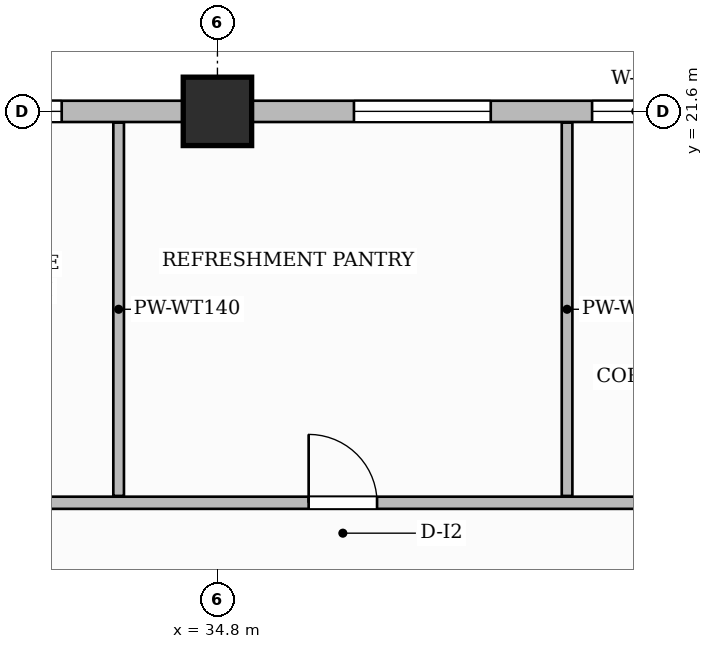
"""IFC4 building model, lengths in metres.
Left out: names, types, materials, properties, quantities, classifications, styles, units other than length and angle.
Written with IfcOpenShell. Run it as: python <this file> out.ifc"""

import sys

from ifc_helpers import new_model, si_unit, direction, frame, frame_2d, origin, origin_2d, place, context, subcontext, project, spatial, rectangle, extrude, source, transform, mapped, element, fill, save


model = new_model("IFC4")
c1 = context("Model", 3, precision=1e-05, world=origin(), true_north=direction((0.0, 1.0)))
c2 = subcontext(c1, "Body", "Model", "MODEL_VIEW")
j1 = project(units=[si_unit("LENGTHUNIT", "METRE"), si_unit("PLANEANGLEUNIT", "RADIAN")], contexts=[c1])
p1 = place(None, origin())
s1 = spatial("IfcSite", under=j1, at=p1, CompositionType="ELEMENT")
p2 = place(p1, origin())
s2 = spatial("IfcBuilding", under=s1, at=p2, CompositionType="ELEMENT")
p3 = place(p2, frame((0.0, 0.0, 221.15)))
s3 = spatial("IfcBuildingStorey", under=s2, at=p3, CompositionType="ELEMENT", Elevation=221.15)
m1 = source(origin(), c2, "Body", "SweptSolid", [
    extrude(rectangle(XDim=0.9, YDim=0.9, at=origin_2d()), origin(), (0.0, 0.0, 1.0), 3.85),
])
p4 = place(p3, frame((34.8, 21.6, 0.0), z_axis=(0.0, 0.0, 1.0), x_axis=(1.0, 0.0, 0.0)))
e1 = element("IfcColumn", 1, at=p4, inside=s3, PredefinedType="COLUMN", context=c2, shape_type="MappedRepresentation", body=[
    mapped(m1, transform((0.0, 0.0, 0.0), scale=1.0)),
])
p5 = place(p3, frame((30.29, 16.45, 0.0), z_axis=(0.0, 0.0, 1.0), x_axis=(1.0, 0.0, 0.0)))
e2 = element("IfcWall", 2, at=p5, inside=s3, PredefinedType="PARTITIONING", context=c2, shape_type="SweptSolid", body=[
    extrude(rectangle(XDim=19.37, YDim=0.16, at=frame_2d((9.685, 0.0))), origin(), (0.0, 0.0, 1.0), 3.6),
])
p6 = place(p5, frame((1.135, 0.0, 0.0)))
e3 = element("IfcOpeningElement", 3, at=p6, cuts=e2, PredefinedType="OPENING", context=c2, shape_type="SweptSolid", body=[
    extrude(rectangle(XDim=0.85, YDim=2.1, at=frame_2d((0.425, 1.05))), frame((0.0, 0.09, 0.0), z_axis=(0.0, -1.0, 0.0), x_axis=(1.0, 0.0, 0.0)), (0.0, 0.0, 1.0), 0.18),
])
p7 = place(p5, frame((5.71, 0.0, 0.0)))
e4 = element("IfcOpeningElement", 4, at=p7, cuts=e2, PredefinedType="OPENING", context=c2, shape_type="SweptSolid", body=[
    extrude(rectangle(XDim=0.9, YDim=2.15, at=frame_2d((0.45, 1.075))), frame((0.0, 0.09, 0.0), z_axis=(0.0, -1.0, 0.0), x_axis=(1.0, 0.0, 0.0)), (0.0, 0.0, 1.0), 0.18),
])
p8 = place(p5, frame((10.635, 0.0, 0.0)))
e5 = element("IfcOpeningElement", 5, at=p8, cuts=e2, PredefinedType="OPENING", context=c2, shape_type="SweptSolid", body=[
    extrude(rectangle(XDim=0.95, YDim=2.15, at=frame_2d((0.475, 1.075))), frame((0.0, 0.09, 0.0), z_axis=(0.0, -1.0, 0.0), x_axis=(1.0, 0.0, 0.0)), (0.0, 0.0, 1.0), 0.18),
])
p9 = place(p5, frame((16.235, 0.0, 0.0)))
e6 = element("IfcOpeningElement", 6, at=p9, cuts=e2, PredefinedType="OPENING", context=c2, shape_type="SweptSolid", body=[
    extrude(rectangle(XDim=0.95, YDim=2.15, at=frame_2d((0.475, 1.075))), frame((0.0, 0.09, 0.0), z_axis=(0.0, -1.0, 0.0), x_axis=(1.0, 0.0, 0.0)), (0.0, 0.0, 1.0), 0.18),
])
for number, where, z_axis, x_axis in (
    (7, (33.5, 16.54, 0.0), (0.0, 0.0, 1.0), (0.0, 1.0, 0.0)),
    (8, (39.4, 16.54, 0.0), (0.0, 0.0, 1.0), (0.0, 1.0, 0.0)),
):
    element("IfcWall", number, at=place(p3, frame(where, z_axis=z_axis, x_axis=x_axis)), inside=s3, PredefinedType="PARTITIONING", context=c2, shape_type="SweptSolid", body=[
        extrude(rectangle(XDim=4.912, YDim=0.14, at=frame_2d((2.456, 0.0))), origin(), (0.0, 0.0, 1.0), 3.6),
    ])
p10 = place(p3, frame((14.4, 21.6, 0.0), z_axis=(0.0, 0.0, 1.0), x_axis=(1.0, 0.0, 0.0)))
e9 = element("IfcWall", 9, at=p10, inside=s3, PredefinedType="SOLIDWALL", context=c2, shape_type="SweptSolid", body=[
    extrude(rectangle(XDim=35.4, YDim=0.28, at=frame_2d((17.7, 0.0))), origin(), (0.0, 0.0, 1.0), 3.135),
])
p11 = place(p10, frame((0.85, 0.0, 0.0)))
e10 = element("IfcOpeningElement", 10, at=p11, cuts=e9, PredefinedType="OPENING", context=c2, shape_type="SweptSolid", body=[
    extrude(rectangle(XDim=1.2, YDim=2.2, at=frame_2d((0.6, 1.1))), frame((0.0, 0.15, 0.0), z_axis=(0.0, -1.0, 0.0), x_axis=(1.0, 0.0, 0.0)), (0.0, 0.0, 1.0), 0.3),
])
p12 = place(p10, frame((3.679, 0.0, 0.8)))
e11 = element("IfcOpeningElement", 11, at=p12, cuts=e9, PredefinedType="OPENING", context=c2, shape_type="SweptSolid", body=[
    extrude(rectangle(XDim=1.8, YDim=1.85, at=frame_2d((0.9, 0.925))), frame((0.0, 0.15, 0.0), z_axis=(0.0, -1.0, 0.0), x_axis=(1.0, 0.0, 0.0)), (0.0, 0.0, 1.0), 0.3),
])
p13 = place(p10, frame((8.181, 0.0, 0.8)))
e12 = element("IfcOpeningElement", 12, at=p13, cuts=e9, PredefinedType="OPENING", context=c2, shape_type="SweptSolid", body=[
    extrude(rectangle(XDim=0.95, YDim=1.75, at=frame_2d((0.475, 0.875))), frame((0.0, 0.15, 0.0), z_axis=(0.0, -1.0, 0.0), x_axis=(1.0, 0.0, 0.0)), (0.0, 0.0, 1.0), 0.3),
])
p14 = place(p10, frame((10.564, 0.0, 0.8)))
e13 = element("IfcOpeningElement", 13, at=p14, cuts=e9, PredefinedType="OPENING", context=c2, shape_type="SweptSolid", body=[
    extrude(rectangle(XDim=1.8, YDim=1.85, at=frame_2d((0.9, 0.925))), frame((0.0, 0.15, 0.0), z_axis=(0.0, -1.0, 0.0), x_axis=(1.0, 0.0, 0.0)), (0.0, 0.0, 1.0), 0.3),
])
p15 = place(p10, frame((16.551, 0.0, 0.8)))
e14 = element("IfcOpeningElement", 14, at=p15, cuts=e9, PredefinedType="OPENING", context=c2, shape_type="SweptSolid", body=[
    extrude(rectangle(XDim=1.8, YDim=1.85, at=frame_2d((0.9, 0.925))), frame((0.0, 0.15, 0.0), z_axis=(0.0, -1.0, 0.0), x_axis=(1.0, 0.0, 0.0)), (0.0, 0.0, 1.0), 0.3),
])
p16 = place(p10, frame((22.196, 0.0, 0.8)))
e15 = element("IfcOpeningElement", 15, at=p16, cuts=e9, PredefinedType="OPENING", context=c2, shape_type="SweptSolid", body=[
    extrude(rectangle(XDim=1.8, YDim=1.85, at=frame_2d((0.9, 0.925))), frame((0.0, 0.15, 0.0), z_axis=(0.0, -1.0, 0.0), x_axis=(1.0, 0.0, 0.0)), (0.0, 0.0, 1.0), 0.3),
])
p17 = place(p10, frame((25.329, 0.0, 0.8)))
e16 = element("IfcOpeningElement", 16, at=p17, cuts=e9, PredefinedType="OPENING", context=c2, shape_type="SweptSolid", body=[
    extrude(rectangle(XDim=1.15, YDim=1.8, at=frame_2d((0.575, 0.9))), frame((0.0, 0.15, 0.0), z_axis=(0.0, -1.0, 0.0), x_axis=(1.0, 0.0, 0.0)), (0.0, 0.0, 1.0), 0.3),
])
p18 = place(p10, frame((28.721, 0.0, 0.8)))
e17 = element("IfcOpeningElement", 17, at=p18, cuts=e9, PredefinedType="OPENING", context=c2, shape_type="SweptSolid", body=[
    extrude(rectangle(XDim=0.95, YDim=1.75, at=frame_2d((0.475, 0.875))), frame((0.0, 0.15, 0.0), z_axis=(0.0, -1.0, 0.0), x_axis=(1.0, 0.0, 0.0)), (0.0, 0.0, 1.0), 0.3),
])
p19 = place(p10, frame((31.404, 0.0, 0.8)))
e18 = element("IfcOpeningElement", 18, at=p19, cuts=e9, PredefinedType="OPENING", context=c2, shape_type="SweptSolid", body=[
    extrude(rectangle(XDim=1.8, YDim=1.85, at=frame_2d((0.9, 0.925))), frame((0.0, 0.15, 0.0), z_axis=(0.0, -1.0, 0.0), x_axis=(1.0, 0.0, 0.0)), (0.0, 0.0, 1.0), 0.3),
])
m2 = source(origin(), c2, "Body", "SweptSolid", [
    extrude(rectangle(XDim=0.9, YDim=2.15, at=frame_2d((0.45, 1.075))), frame((0.0, 0.025, 0.0), z_axis=(0.0, -1.0, 0.0), x_axis=(1.0, 0.0, 0.0)), (0.0, 0.0, 1.0), 0.05),
])
p20 = place(p7, origin())
e19 = element("IfcDoor", 19, at=p20, inside=s3, OperationType="SINGLE_SWING_LEFT", PredefinedType="DOOR", context=c2, shape_type="MappedRepresentation", body=[
    mapped(m2, transform((0.0, 0.0, 0.0), scale=1.0)),
])
fill(e4, e19)
m3 = source(origin(), c2, "Body", "SweptSolid", [
    extrude(rectangle(XDim=1.8, YDim=1.85, at=frame_2d((0.9, 0.925))), frame((0.0, 0.03, 0.0), z_axis=(0.0, -1.0, 0.0), x_axis=(1.0, 0.0, 0.0)), (0.0, 0.0, 1.0), 0.06),
])
p21 = place(p15, origin())
e20 = element("IfcWindow", 20, at=p21, inside=s3, PartitioningType="DOUBLE_PANEL_VERTICAL", PredefinedType="WINDOW", context=c2, shape_type="MappedRepresentation", body=[
    mapped(m3, transform((0.0, 0.0, 0.0), scale=1.0)),
])
fill(e14, e20)
p22 = place(p16, origin())
e21 = element("IfcWindow", 21, at=p22, inside=s3, PartitioningType="DOUBLE_PANEL_VERTICAL", PredefinedType="WINDOW", context=c2, shape_type="MappedRepresentation", body=[
    mapped(m3, transform((0.0, 0.0, 0.0), scale=1.0)),
])
fill(e15, e21)
m4 = source(origin(), c2, "Body", "SweptSolid", [
    extrude(rectangle(XDim=1.15, YDim=1.8, at=frame_2d((0.575, 0.9))), frame((0.0, 0.03, 0.0), z_axis=(0.0, -1.0, 0.0), x_axis=(1.0, 0.0, 0.0)), (0.0, 0.0, 1.0), 0.06),
])
p23 = place(p17, origin())
e22 = element("IfcWindow", 22, at=p23, inside=s3, PartitioningType="SINGLE_PANEL", PredefinedType="WINDOW", context=c2, shape_type="MappedRepresentation", body=[
    mapped(m4, transform((0.0, 0.0, 0.0), scale=1.0)),
])
fill(e16, e22)
save(model, sys.argv[1])
